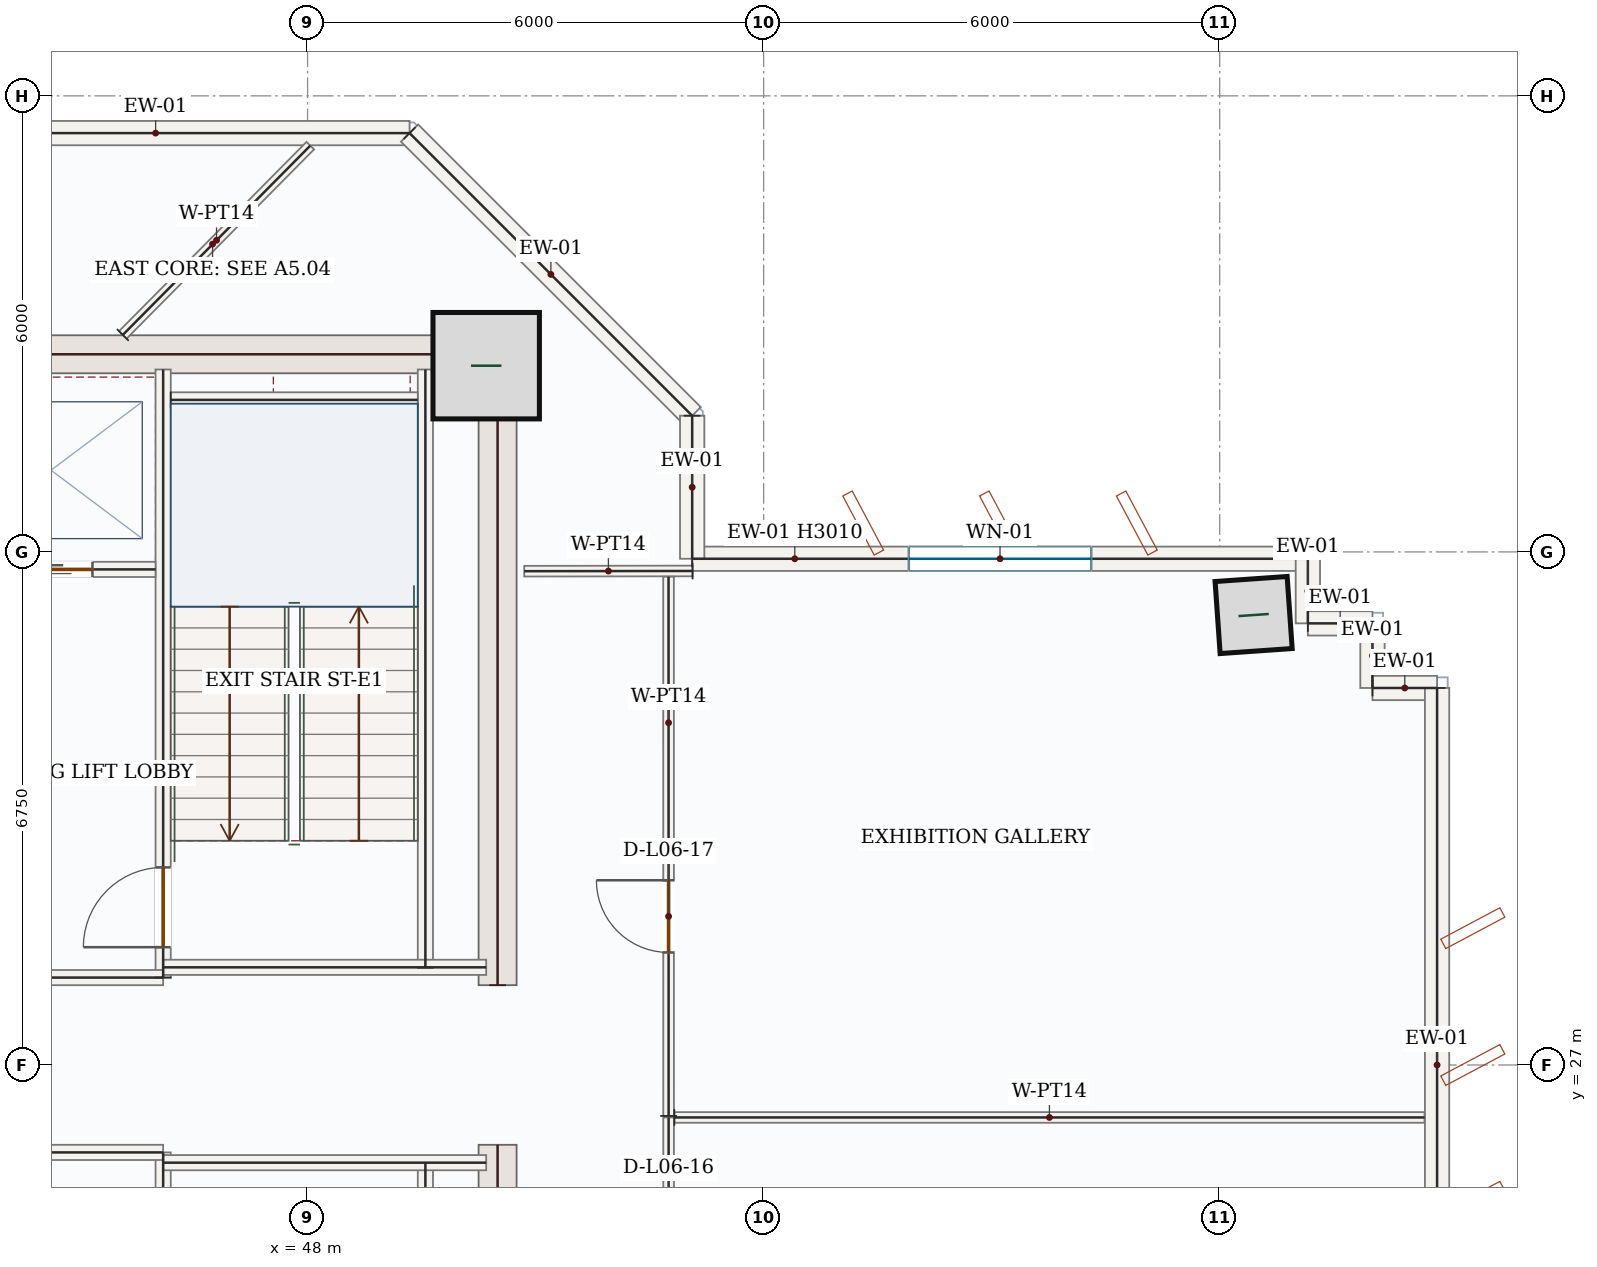
"""IFC4 building model, lengths in metres.
Left out: names, types, materials, properties, quantities, classifications, styles, units other than length and angle.
Written with IfcOpenShell. Run it as: python <this file> out.ifc"""

import sys

from ifc_helpers import new_model, si_unit, direction, frame, frame_2d, origin, origin_2d, place, context, subcontext, project, spatial, rectangle, hollow_rectangle, extrude, source, transform, mapped, element, fill, save


model = new_model("IFC4")
c1 = context("Model", 3, precision=1e-05, world=origin(), true_north=direction((0.0, 1.0)))
c2 = subcontext(c1, "Body", "Model", "MODEL_VIEW")
j1 = project(units=[si_unit("LENGTHUNIT", "METRE"), si_unit("PLANEANGLEUNIT", "RADIAN")], contexts=[c1])
p1 = place(None, origin())
s1 = spatial("IfcSite", under=j1, at=p1, CompositionType="ELEMENT")
p2 = place(p1, origin())
s2 = spatial("IfcBuilding", under=s1, at=p2, CompositionType="ELEMENT")
p3 = place(p2, frame((0.0, 0.0, 33.3)))
s3 = spatial("IfcBuildingStorey", under=s2, at=p3, CompositionType="ELEMENT", Elevation=33.3)
m1 = source(origin(), c2, "Body", "SweptSolid", [
    extrude(rectangle(XDim=8.55, YDim=0.5, at=frame_2d((4.275, 0.0))), origin(), (0.0, 0.0, 1.0), 3.95),
])
for number, where, z_axis, x_axis in (
    (1, (50.5, 17.4, 0.0), (0.0, 0.0, 1.0), (0.0, 1.0, 0.0)),
    (2, (50.5, 28.05, 0.0), (0.0, 0.0, 1.0), (0.0, 1.0, 0.0)),
):
    element("IfcWall", number, at=place(p3, frame(where, z_axis=z_axis, x_axis=x_axis)), inside=s3, PredefinedType="SHEAR", context=c2, shape_type="MappedRepresentation", body=[
        mapped(m1, transform((0.0, 0.0, 0.0), x_axis=(1.0, 0.0, 0.0), y_axis=(0.0, 1.0, 0.0), z_axis=(0.0, 0.0, 1.0), scale=1.0)),
    ])
m2 = source(origin(), c2, "Body", "SweptSolid", [
    extrude(rectangle(XDim=7.0, YDim=0.5, at=frame_2d((3.5, 0.0))), origin(), (0.0, 0.0, 1.0), 3.95),
])
p4 = place(p3, frame((43.25, 36.35, 0.0), z_axis=(0.0, 0.0, 1.0), x_axis=(1.0, 0.0, 0.0)))
e3 = element("IfcWall", 3, at=p4, inside=s3, PredefinedType="SHEAR", context=c2, shape_type="MappedRepresentation", body=[
    mapped(m2, transform((0.0, 0.0, 0.0), x_axis=(1.0, 0.0, 0.0), y_axis=(0.0, 1.0, 0.0), z_axis=(0.0, 0.0, 1.0), scale=1.0)),
])
m3 = source(origin(), c2, "Body", "SweptSolid", [
    extrude(rectangle(XDim=1.4, YDim=1.4, at=origin_2d()), origin(), (0.0, 0.0, 1.0), 4.2),
])
p5 = place(p3, frame((50.35, 36.2, 0.0), z_axis=(0.0, 0.0, 1.0), x_axis=(1.0, 0.0, 0.0)))
e4 = element("IfcColumn", 4, at=p5, inside=s3, PredefinedType="COLUMN", context=c2, shape_type="MappedRepresentation", body=[
    mapped(m3, transform((0.0, 0.0, 0.0), x_axis=(1.0, 0.0, 0.0), y_axis=(0.0, 1.0, 0.0), z_axis=(0.0, 0.0, 1.0), scale=1.0)),
])
m4 = source(origin(), c2, "Body", "SweptSolid", [
    extrude(hollow_rectangle(XDim=0.95, YDim=0.95, WallThickness=0.05, at=origin_2d()), origin(), (0.0, 0.0, 1.0), 4.2),
])
p6 = place(p3, frame((60.447, 32.92, 0.0), z_axis=(0.0, 0.0, 1.0), x_axis=(0.99756405026, 0.069756473744, 0.0)))
e5 = element("IfcColumn", 5, at=p6, inside=s3, PredefinedType="COLUMN", context=c2, shape_type="MappedRepresentation", body=[
    mapped(m4, transform((0.0, 0.0, 0.0), x_axis=(1.0, 0.0, 0.0), y_axis=(0.0, 1.0, 0.0), z_axis=(0.0, 0.0, 1.0), scale=1.0)),
])
p7 = place(p3, frame((53.06, 33.66, 0.0), z_axis=(0.0, 0.0, 1.0), x_axis=(1.0, 0.0, 0.0)))
e6 = element("IfcWall", 6, at=p7, inside=s3, PredefinedType="SOLIDWALL", context=c2, shape_type="SweptSolid", body=[
    extrude(rectangle(XDim=8.1, YDim=0.32, at=frame_2d((4.05, 0.0))), origin(), (0.0, 0.0, 1.0), 3.01),
])
p8 = place(p7, frame((2.85, 0.0, 0.85)))
e7 = element("IfcOpeningElement", 7, at=p8, cuts=e6, PredefinedType="OPENING", context=c2, shape_type="SweptSolid", body=[
    extrude(rectangle(XDim=2.4, YDim=1.8, at=frame_2d((1.2, 0.9))), frame((0.0, 0.17, 0.0), z_axis=(0.0, -1.0, 0.0), x_axis=(1.0, 0.0, 0.0)), (0.0, 0.0, 1.0), 0.34),
])
m5 = source(origin(), c2, "Body", "SweptSolid", [
    extrude(rectangle(XDim=0.85, YDim=0.32, at=frame_2d((0.425, 0.0))), origin(), (0.0, 0.0, 1.0), 3.95),
])
p9 = place(p3, frame((61.16, 33.66, 0.0), z_axis=(0.0, 0.0, 1.0), x_axis=(0.0, -1.0, 0.0)))
e8 = element("IfcWall", 8, at=p9, inside=s3, PredefinedType="SOLIDWALL", context=c2, shape_type="MappedRepresentation", body=[
    mapped(m5, transform((0.0, 0.0, 0.0), x_axis=(1.0, 0.0, 0.0), y_axis=(0.0, 1.0, 0.0), z_axis=(0.0, 0.0, 1.0), scale=1.0)),
])
m6 = source(origin(), c2, "Body", "SweptSolid", [
    extrude(rectangle(XDim=0.85, YDim=0.32, at=frame_2d((0.425, 0.0))), origin(), (0.0, 0.0, 1.0), 3.95),
])
for number, where, z_axis, x_axis in (
    (9, (61.16, 32.81, 0.0), (0.0, 0.0, 1.0), (1.0, 0.0, 0.0)),
    (10, (62.01, 32.81, 0.0), (0.0, 0.0, 1.0), (0.0, -1.0, 0.0)),
    (11, (62.01, 31.96, 0.0), (0.0, 0.0, 1.0), (1.0, 0.0, 0.0)),
):
    element("IfcWall", number, at=place(p3, frame(where, z_axis=z_axis, x_axis=x_axis)), inside=s3, PredefinedType="SOLIDWALL", context=c2, shape_type="MappedRepresentation", body=[
        mapped(m6, transform((0.0, 0.0, 0.0), x_axis=(1.0, 0.0, 0.0), y_axis=(0.0, 1.0, 0.0), z_axis=(0.0, 0.0, 1.0), scale=1.0)),
    ])
m7 = source(origin(), c2, "Body", "SweptSolid", [
    extrude(rectangle(XDim=9.92, YDim=0.32, at=frame_2d((4.96, 0.0))), origin(), (0.0, 0.0, 1.0), 3.95),
])
p10 = place(p3, frame((62.86, 31.96, 0.0), z_axis=(0.0, 0.0, 1.0), x_axis=(0.0, -1.0, 0.0)))
e12 = element("IfcWall", 12, at=p10, inside=s3, PredefinedType="SOLIDWALL", context=c2, shape_type="MappedRepresentation", body=[
    mapped(m7, transform((0.0, 0.0, 0.0), x_axis=(1.0, 0.0, 0.0), y_axis=(0.0, 1.0, 0.0), z_axis=(0.0, 0.0, 1.0), scale=1.0)),
])
m8 = source(origin(), c2, "Body", "SweptSolid", [
    extrude(rectangle(XDim=6.682, YDim=0.32, at=frame_2d((3.341, 0.0))), origin(), (0.0, 0.0, 1.0), 3.95),
])
p11 = place(p3, frame((42.66, 39.26, 0.0), z_axis=(0.0, 0.0, 1.0), x_axis=(1.0, 0.0, 0.0)))
e13 = element("IfcWall", 13, at=p11, inside=s3, PredefinedType="SOLIDWALL", context=c2, shape_type="MappedRepresentation", body=[
    mapped(m8, transform((0.0, 0.0, 0.0), x_axis=(1.0, 0.0, 0.0), y_axis=(0.0, 1.0, 0.0), z_axis=(0.0, 0.0, 1.0), scale=1.0)),
])
m9 = source(origin(), c2, "Body", "SweptSolid", [
    extrude(rectangle(XDim=5.258, YDim=0.32, at=frame_2d((2.629, 0.0))), origin(), (0.0, 0.0, 1.0), 3.95),
])
p12 = place(p3, frame((49.342, 39.26, 0.0), z_axis=(0.0, 0.0, 1.0), x_axis=(0.707106781187, -0.707106781187, 0.0)))
e14 = element("IfcWall", 14, at=p12, inside=s3, PredefinedType="SOLIDWALL", context=c2, shape_type="MappedRepresentation", body=[
    mapped(m9, transform((0.0, 0.0, 0.0), x_axis=(1.0, 0.0, 0.0), y_axis=(0.0, 1.0, 0.0), z_axis=(0.0, 0.0, 1.0), scale=1.0)),
])
m10 = source(origin(), c2, "Body", "SweptSolid", [
    extrude(rectangle(XDim=1.882, YDim=0.32, at=frame_2d((0.941, 0.0))), origin(), (0.0, 0.0, 1.0), 3.95),
])
p13 = place(p3, frame((53.06, 35.542, 0.0), z_axis=(0.0, 0.0, 1.0), x_axis=(0.0, -1.0, 0.0)))
e15 = element("IfcWall", 15, at=p13, inside=s3, PredefinedType="SOLIDWALL", context=c2, shape_type="MappedRepresentation", body=[
    mapped(m10, transform((0.0, 0.0, 0.0), x_axis=(1.0, 0.0, 0.0), y_axis=(0.0, 1.0, 0.0), z_axis=(0.0, 0.0, 1.0), scale=1.0)),
])
m11 = source(origin(), c2, "Body", "SweptSolid", [
    extrude(rectangle(XDim=7.87, YDim=0.2, at=frame_2d((3.935, 0.0))), origin(), (0.0, 0.0, 1.0), 3.95),
])
for number, where, z_axis, x_axis in (
    (16, (49.55, 17.85, 0.0), (0.0, 0.0, 1.0), (0.0, 1.0, 0.0)),
    (17, (49.55, 28.28, 0.0), (0.0, 0.0, 1.0), (0.0, 1.0, 0.0)),
):
    element("IfcWall", number, at=place(p3, frame(where, z_axis=z_axis, x_axis=x_axis)), inside=s3, PredefinedType="SOLIDWALL", context=c2, shape_type="MappedRepresentation", body=[
        mapped(m11, transform((0.0, 0.0, 0.0), x_axis=(1.0, 0.0, 0.0), y_axis=(0.0, 1.0, 0.0), z_axis=(0.0, 0.0, 1.0), scale=1.0)),
    ])
p14 = place(p3, frame((46.1, 17.85, 0.0), z_axis=(0.0, 0.0, 1.0), x_axis=(0.0, 1.0, 0.0)))
e18 = element("IfcWall", 18, at=p14, inside=s3, PredefinedType="SOLIDWALL", context=c2, shape_type="SweptSolid", body=[
    extrude(rectangle(XDim=8.0, YDim=0.2, at=frame_2d((4.0, 0.0))), origin(), (0.0, 0.0, 1.0), 3.95),
])
p15 = place(p14, frame((6.3, 0.0, 0.0)))
e19 = element("IfcOpeningElement", 19, at=p15, cuts=e18, PredefinedType="OPENING", context=c2, shape_type="SweptSolid", body=[
    extrude(rectangle(XDim=1.05, YDim=2.15, at=frame_2d((0.525, 1.075))), frame((0.0, 0.11, 0.0), z_axis=(0.0, -1.0, 0.0), x_axis=(1.0, 0.0, 0.0)), (0.0, 0.0, 1.0), 0.22),
])
p16 = place(p3, frame((46.1, 28.15, 0.0), z_axis=(0.0, 0.0, 1.0), x_axis=(0.0, 1.0, 0.0)))
e20 = element("IfcWall", 20, at=p16, inside=s3, PredefinedType="SOLIDWALL", context=c2, shape_type="SweptSolid", body=[
    extrude(rectangle(XDim=8.0, YDim=0.2, at=frame_2d((4.0, 0.0))), origin(), (0.0, 0.0, 1.0), 3.95),
])
p17 = place(p16, frame((0.4, 0.0, 0.0)))
e21 = element("IfcOpeningElement", 21, at=p17, cuts=e20, PredefinedType="OPENING", context=c2, shape_type="SweptSolid", body=[
    extrude(rectangle(XDim=1.05, YDim=2.15, at=frame_2d((0.525, 1.075))), frame((0.0, 0.11, 0.0), z_axis=(0.0, -1.0, 0.0), x_axis=(1.0, 0.0, 0.0)), (0.0, 0.0, 1.0), 0.22),
])
m12 = source(origin(), c2, "Body", "SweptSolid", [
    extrude(rectangle(XDim=3.0, YDim=0.2, at=frame_2d((1.5, 0.0))), origin(), (0.0, 0.0, 1.0), 3.95),
])
p18 = place(p3, frame((43.1, 25.85, 0.0), z_axis=(0.0, 0.0, 1.0), x_axis=(1.0, 0.0, 0.0)))
e22 = element("IfcWall", 22, at=p18, inside=s3, PredefinedType="SOLIDWALL", context=c2, shape_type="MappedRepresentation", body=[
    mapped(m12, transform((0.0, 0.0, 0.0), x_axis=(1.0, 0.0, 0.0), y_axis=(0.0, 1.0, 0.0), z_axis=(0.0, 0.0, 1.0), scale=1.0)),
])
m13 = source(origin(), c2, "Body", "SweptSolid", [
    extrude(rectangle(XDim=4.25, YDim=0.2, at=frame_2d((2.125, 0.0))), origin(), (0.0, 0.0, 1.0), 3.95),
])
p19 = place(p3, frame((46.1, 25.715, 0.0), z_axis=(0.0, 0.0, 1.0), x_axis=(1.0, 0.0, 0.0)))
e23 = element("IfcWall", 23, at=p19, inside=s3, PredefinedType="SOLIDWALL", context=c2, shape_type="MappedRepresentation", body=[
    mapped(m13, transform((0.0, 0.0, 0.0), x_axis=(1.0, 0.0, 0.0), y_axis=(0.0, 1.0, 0.0), z_axis=(0.0, 0.0, 1.0), scale=1.0)),
])
p20 = place(p3, frame((43.1, 28.15, 0.0), z_axis=(0.0, 0.0, 1.0), x_axis=(1.0, 0.0, 0.0)))
e24 = element("IfcWall", 24, at=p20, inside=s3, PredefinedType="SOLIDWALL", context=c2, shape_type="MappedRepresentation", body=[
    mapped(m12, transform((0.0, 0.0, 0.0), x_axis=(1.0, 0.0, 0.0), y_axis=(0.0, 1.0, 0.0), z_axis=(0.0, 0.0, 1.0), scale=1.0)),
])
p21 = place(p3, frame((46.1, 28.285, 0.0), z_axis=(0.0, 0.0, 1.0), x_axis=(1.0, 0.0, 0.0)))
e25 = element("IfcWall", 25, at=p21, inside=s3, PredefinedType="SOLIDWALL", context=c2, shape_type="MappedRepresentation", body=[
    mapped(m13, transform((0.0, 0.0, 0.0), x_axis=(1.0, 0.0, 0.0), y_axis=(0.0, 1.0, 0.0), z_axis=(0.0, 0.0, 1.0), scale=1.0)),
])
m14 = source(origin(), c2, "Body", "SweptSolid", [
    extrude(rectangle(XDim=3.25, YDim=0.2, at=frame_2d((1.625, 0.0))), origin(), (0.0, 0.0, 1.0), 3.95),
])
p22 = place(p3, frame((46.2, 35.75, 0.0), z_axis=(0.0, 0.0, 1.0), x_axis=(1.0, 0.0, 0.0)))
e26 = element("IfcWall", 26, at=p22, inside=s3, PredefinedType="SOLIDWALL", context=c2, shape_type="MappedRepresentation", body=[
    mapped(m14, transform((0.0, 0.0, 0.0), x_axis=(1.0, 0.0, 0.0), y_axis=(0.0, 1.0, 0.0), z_axis=(0.0, 0.0, 1.0), scale=1.0)),
])
p23 = place(p3, frame((43.25, 33.52, 0.0), z_axis=(0.0, 0.0, 1.0), x_axis=(1.0, 0.0, 0.0)))
e27 = element("IfcWall", 27, at=p23, inside=s3, PredefinedType="SOLIDWALL", context=c2, shape_type="SweptSolid", body=[
    extrude(rectangle(XDim=2.75, YDim=0.2, at=frame_2d((1.375, 0.0))), origin(), (0.0, 0.0, 1.0), 3.95),
])
p24 = place(p23, frame((0.82, 0.0, 0.0)))
e28 = element("IfcOpeningElement", 28, at=p24, cuts=e27, PredefinedType="OPENING", context=c2, shape_type="SweptSolid", body=[
    extrude(rectangle(XDim=1.1, YDim=2.15, at=frame_2d((0.55, 1.075))), frame((0.0, 0.11, 0.0), z_axis=(0.0, -1.0, 0.0), x_axis=(1.0, 0.0, 0.0)), (0.0, 0.0, 1.0), 0.22),
])
p25 = place(p3, frame((52.75, 20.575, 0.0), z_axis=(0.0, 0.0, 1.0), x_axis=(0.0, 1.0, 0.0)))
e29 = element("IfcWall", 29, at=p25, inside=s3, PredefinedType="PARTITIONING", context=c2, shape_type="SweptSolid", body=[
    extrude(rectangle(XDim=5.735, YDim=0.14, at=frame_2d((2.868, 0.0))), origin(), (0.0, 0.0, 1.0), 3.95),
])
p26 = place(p25, frame((3.732, 0.0, 0.0)))
e30 = element("IfcOpeningElement", 30, at=p26, cuts=e29, PredefinedType="OPENING", context=c2, shape_type="SweptSolid", body=[
    extrude(rectangle(XDim=0.95, YDim=2.15, at=frame_2d((0.475, 1.075))), frame((0.0, 0.08, 0.0), z_axis=(0.0, -1.0, 0.0), x_axis=(1.0, 0.0, 0.0)), (0.0, 0.0, 1.0), 0.16),
])
m15 = source(origin(), c2, "Body", "SweptSolid", [
    extrude(rectangle(XDim=9.87, YDim=0.14, at=frame_2d((4.935, 0.0))), origin(), (0.0, 0.0, 1.0), 3.95),
])
p27 = place(p3, frame((52.825, 26.31, 0.0), z_axis=(0.0, 0.0, 1.0), x_axis=(1.0, 0.0, 0.0)))
e31 = element("IfcWall", 31, at=p27, inside=s3, PredefinedType="PARTITIONING", context=c2, shape_type="MappedRepresentation", body=[
    mapped(m15, transform((0.0, 0.0, 0.0), x_axis=(1.0, 0.0, 0.0), y_axis=(0.0, 1.0, 0.0), z_axis=(0.0, 0.0, 1.0), scale=1.0)),
])
m16 = source(origin(), c2, "Body", "SweptSolid", [
    extrude(rectangle(XDim=2.214, YDim=0.14, at=frame_2d((1.107, 0.0))), origin(), (0.0, 0.0, 1.0), 3.95),
])
p28 = place(p3, frame((53.065, 33.5, 0.0), z_axis=(0.0, 0.0, 1.0), x_axis=(-0.99999912478, -0.001323041841, 0.0)))
e32 = element("IfcWall", 32, at=p28, inside=s3, PredefinedType="PARTITIONING", context=c2, shape_type="MappedRepresentation", body=[
    mapped(m16, transform((0.0, 0.0, 0.0), x_axis=(1.0, 0.0, 0.0), y_axis=(0.0, 1.0, 0.0), z_axis=(0.0, 0.0, 1.0), scale=1.0)),
])
m17 = source(origin(), c2, "Body", "SweptSolid", [
    extrude(rectangle(XDim=3.505, YDim=0.14, at=frame_2d((1.752, 0.0))), origin(), (0.0, 0.0, 1.0), 3.95),
])
p29 = place(p3, frame((45.569, 36.605, 0.0), z_axis=(0.0, 0.0, 1.0), x_axis=(0.703790445361, 0.710407635811, 0.0)))
e33 = element("IfcWall", 33, at=p29, inside=s3, PredefinedType="PARTITIONING", context=c2, shape_type="MappedRepresentation", body=[
    mapped(m17, transform((0.0, 0.0, 0.0), x_axis=(1.0, 0.0, 0.0), y_axis=(0.0, 1.0, 0.0), z_axis=(0.0, 0.0, 1.0), scale=1.0)),
])
p30 = place(p3, frame((52.75, 26.33, 0.0), z_axis=(0.0, 0.0, 1.0), x_axis=(-0.000137660459, 0.999999990525, 0.0)))
e34 = element("IfcWall", 34, at=p30, inside=s3, PredefinedType="PARTITIONING", context=c2, shape_type="SweptSolid", body=[
    extrude(rectangle(XDim=7.094, YDim=0.14, at=frame_2d((3.547, 0.0))), origin(), (0.0, 0.0, 1.0), 3.95),
])
p31 = place(p30, frame((2.15, 0.0, 0.0)))
e35 = element("IfcOpeningElement", 35, at=p31, cuts=e34, PredefinedType="OPENING", context=c2, shape_type="SweptSolid", body=[
    extrude(rectangle(XDim=0.95, YDim=2.15, at=frame_2d((0.475, 1.075))), frame((0.0, 0.08, 0.0), z_axis=(0.0, -1.0, 0.0), x_axis=(1.0, 0.0, 0.0)), (0.0, 0.0, 1.0), 0.16),
])
m18 = source(origin(), c2, "Body", "SweptSolid", [
    extrude(rectangle(XDim=2.4, YDim=1.8, at=frame_2d((1.2, 0.9))), frame((0.0, 0.03, 0.0), z_axis=(0.0, -1.0, 0.0), x_axis=(1.0, 0.0, 0.0)), (0.0, 0.0, 1.0), 0.06),
])
p32 = place(p8, origin())
e36 = element("IfcWindow", 36, at=p32, inside=s3, PartitioningType="DOUBLE_PANEL_VERTICAL", PredefinedType="WINDOW", context=c2, shape_type="MappedRepresentation", body=[
    mapped(m18, transform((0.0, 0.0, 0.0), x_axis=(1.0, 0.0, 0.0), y_axis=(0.0, 1.0, 0.0), z_axis=(0.0, 0.0, 1.0), scale=1.0)),
])
fill(e7, e36)
m19 = source(origin(), c2, "Body", "SweptSolid", [
    extrude(rectangle(XDim=1.05, YDim=2.15, at=frame_2d((0.525, 1.075))), frame((0.0, 0.025, 0.0), z_axis=(0.0, -1.0, 0.0), x_axis=(1.0, 0.0, 0.0)), (0.0, 0.0, 1.0), 0.05),
])
p33 = place(p17, origin())
e37 = element("IfcDoor", 37, at=p33, inside=s3, OperationType="SINGLE_SWING_LEFT", PredefinedType="DOOR", context=c2, shape_type="MappedRepresentation", body=[
    mapped(m19, transform((0.0, 0.0, 0.0), x_axis=(1.0, 0.0, 0.0), y_axis=(0.0, 1.0, 0.0), z_axis=(0.0, 0.0, 1.0), scale=1.0)),
])
fill(e21, e37)
m20 = source(origin(), c2, "Body", "SweptSolid", [
    extrude(rectangle(XDim=1.1, YDim=2.15, at=frame_2d((0.55, 1.075))), frame((0.0, 0.025, 0.0), z_axis=(0.0, -1.0, 0.0), x_axis=(1.0, 0.0, 0.0)), (0.0, 0.0, 1.0), 0.05),
])
p34 = place(p24, origin())
e38 = element("IfcDoor", 38, at=p34, inside=s3, OperationType="DOUBLE_DOOR_SLIDING", PredefinedType="DOOR", context=c2, shape_type="MappedRepresentation", body=[
    mapped(m20, transform((0.0, 0.0, 0.0), x_axis=(1.0, 0.0, 0.0), y_axis=(0.0, 1.0, 0.0), z_axis=(0.0, 0.0, 1.0), scale=1.0)),
])
fill(e28, e38)
m21 = source(origin(), c2, "Body", "SweptSolid", [
    extrude(rectangle(XDim=0.95, YDim=2.15, at=frame_2d((0.475, 1.075))), frame((0.0, 0.025, 0.0), z_axis=(0.0, -1.0, 0.0), x_axis=(1.0, 0.0, 0.0)), (0.0, 0.0, 1.0), 0.05),
])
p35 = place(p31, origin())
e39 = element("IfcDoor", 39, at=p35, inside=s3, OperationType="SINGLE_SWING_RIGHT", PredefinedType="DOOR", context=c2, shape_type="MappedRepresentation", body=[
    mapped(m21, transform((0.0, 0.0, 0.0), x_axis=(1.0, 0.0, 0.0), y_axis=(0.0, 1.0, 0.0), z_axis=(0.0, 0.0, 1.0), scale=1.0)),
])
fill(e35, e39)
save(model, sys.argv[1])
